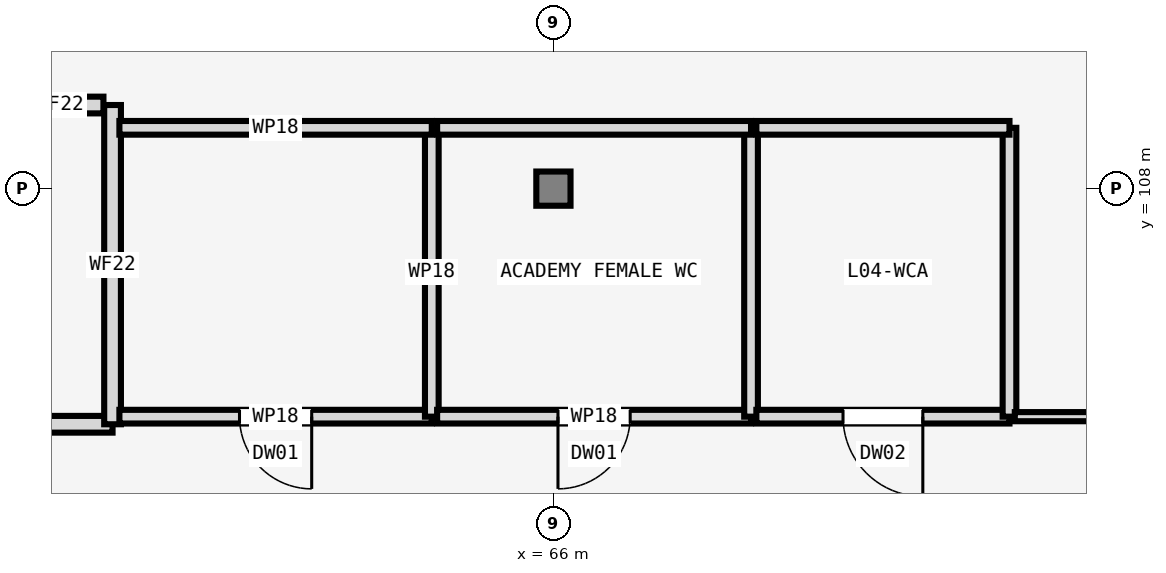
"""IFC4 building model, lengths in metres.
Left out: names, types, materials, properties, quantities, classifications, styles, units other than length and angle.
Written with IfcOpenShell. Run it as: python <this file> out.ifc"""

import sys

from ifc_helpers import new_model, si_unit, direction, frame, frame_2d, origin, origin_2d, place, context, subcontext, project, spatial, rectangle, extrude, element, fill, save


model = new_model("IFC4")
c1 = context("Model", 3, precision=1e-05, world=origin(), true_north=direction((0.0, 1.0)))
c2 = subcontext(c1, "Body", "Model", "MODEL_VIEW")
j1 = project(units=[si_unit("LENGTHUNIT", "METRE"), si_unit("PLANEANGLEUNIT", "RADIAN")], contexts=[c1])
p1 = place(None, origin())
s1 = spatial("IfcSite", under=j1, at=p1, CompositionType="ELEMENT")
p2 = place(p1, origin())
s2 = spatial("IfcBuilding", under=s1, at=p2, CompositionType="ELEMENT")
p3 = place(p2, frame((0.0, 0.0, 17.7)))
s3 = spatial("IfcBuildingStorey", under=s2, at=p3, CompositionType="ELEMENT", Elevation=17.7)
p4 = place(p3, frame((66.0, 108.0, 0.0), z_axis=(0.0, 0.0, 1.0), x_axis=(1.0, 0.0, 0.0)))
e1 = element("IfcColumn", 1, at=p4, inside=s3, PredefinedType="COLUMN", context=c2, shape_type="SweptSolid", body=[
    extrude(rectangle(XDim=0.45, YDim=0.45, at=origin_2d()), origin(), (0.0, 0.0, 1.0), 3.96),
])
p5 = place(p3, frame((55.92, 104.9, 0.0), z_axis=(0.0, 0.0, 1.0), x_axis=(1.0, 0.0, 0.0)))
e2 = element("IfcWall", 2, at=p5, inside=s3, PredefinedType="SOLIDWALL", context=c2, shape_type="SweptSolid", body=[
    extrude(rectangle(XDim=4.28, YDim=0.22, at=frame_2d((2.14, 0.0))), origin(), (0.0, 0.0, 1.0), 3.15),
])
p6 = place(p5, frame((1.24, 0.0, 0.0)))
e3 = element("IfcOpeningElement", 3, at=p6, cuts=e2, PredefinedType="OPENING", context=c2, shape_type="SweptSolid", body=[
    extrude(rectangle(XDim=1.8, YDim=2.2, at=frame_2d((0.9, 1.1))), frame((0.0, 0.12, 0.0), z_axis=(0.0, -1.0, 0.0), x_axis=(1.0, 0.0, 0.0)), (0.0, 0.0, 1.0), 0.24),
])
p7 = place(p3, frame((60.2, 104.9, 0.0), z_axis=(0.0, 0.0, 1.0), x_axis=(0.0, 1.0, 0.0)))
e4 = element("IfcWall", 4, at=p7, inside=s3, PredefinedType="SOLIDWALL", context=c2, shape_type="SweptSolid", body=[
    extrude(rectangle(XDim=4.2, YDim=0.22, at=frame_2d((2.1, 0.0))), origin(), (0.0, 0.0, 1.0), 3.15),
])
p8 = place(p3, frame((58.95, 109.1, 0.0), z_axis=(0.0, 0.0, 1.0), x_axis=(1.0, 0.0, 0.0)))
e5 = element("IfcWall", 5, at=p8, inside=s3, PredefinedType="SOLIDWALL", context=c2, shape_type="SweptSolid", body=[
    extrude(rectangle(XDim=1.13, YDim=0.22, at=frame_2d((0.565, 0.0))), origin(), (0.0, 0.0, 1.0), 3.15),
])
p9 = place(p3, frame((64.4, 105.0, 0.0), z_axis=(0.0, 0.0, 1.0), x_axis=(-1.0, 0.0, 0.0)))
e6 = element("IfcWall", 6, at=p9, inside=s3, PredefinedType="PARTITIONING", context=c2, shape_type="SweptSolid", body=[
    extrude(rectangle(XDim=4.11, YDim=0.18, at=frame_2d((2.055, 0.0))), origin(), (0.0, 0.0, 1.0), 3.15),
])
p10 = place(p9, frame((1.58, 0.0, 0.0)))
e7 = element("IfcOpeningElement", 7, at=p10, cuts=e6, PredefinedType="OPENING", context=c2, shape_type="SweptSolid", body=[
    extrude(rectangle(XDim=0.95, YDim=2.1, at=frame_2d((0.475, 1.05))), frame((0.0, 0.1, 0.0), z_axis=(0.0, -1.0, 0.0), x_axis=(1.0, 0.0, 0.0)), (0.0, 0.0, 1.0), 0.2),
])
p11 = place(p3, frame((64.4, 108.8, 0.0), z_axis=(0.0, 0.0, 1.0), x_axis=(0.0, -1.0, 0.0)))
e8 = element("IfcWall", 8, at=p11, inside=s3, PredefinedType="PARTITIONING", context=c2, shape_type="SweptSolid", body=[
    extrude(rectangle(XDim=3.8, YDim=0.18, at=frame_2d((1.9, 0.0))), origin(), (0.0, 0.0, 1.0), 3.15),
])
p12 = place(p3, frame((60.29, 108.8, 0.0), z_axis=(0.0, 0.0, 1.0), x_axis=(1.0, 0.0, 0.0)))
e9 = element("IfcWall", 9, at=p12, inside=s3, PredefinedType="PARTITIONING", context=c2, shape_type="SweptSolid", body=[
    extrude(rectangle(XDim=4.11, YDim=0.18, at=frame_2d((2.055, 0.0))), origin(), (0.0, 0.0, 1.0), 3.15),
])
p13 = place(p3, frame((68.6, 105.0, 0.0), z_axis=(0.0, 0.0, 1.0), x_axis=(-1.0, 0.0, 0.0)))
e10 = element("IfcWall", 10, at=p13, inside=s3, PredefinedType="PARTITIONING", context=c2, shape_type="SweptSolid", body=[
    extrude(rectangle(XDim=4.13, YDim=0.18, at=frame_2d((2.065, 0.0))), origin(), (0.0, 0.0, 1.0), 3.15),
])
p14 = place(p13, frame((1.59, 0.0, 0.0)))
e11 = element("IfcOpeningElement", 11, at=p14, cuts=e10, PredefinedType="OPENING", context=c2, shape_type="SweptSolid", body=[
    extrude(rectangle(XDim=0.95, YDim=2.1, at=frame_2d((0.475, 1.05))), frame((0.0, 0.1, 0.0), z_axis=(0.0, -1.0, 0.0), x_axis=(1.0, 0.0, 0.0)), (0.0, 0.0, 1.0), 0.2),
])
p15 = place(p3, frame((68.6, 108.8, 0.0), z_axis=(0.0, 0.0, 1.0), x_axis=(0.0, -1.0, 0.0)))
e12 = element("IfcWall", 12, at=p15, inside=s3, PredefinedType="PARTITIONING", context=c2, shape_type="SweptSolid", body=[
    extrude(rectangle(XDim=3.8, YDim=0.18, at=frame_2d((1.9, 0.0))), origin(), (0.0, 0.0, 1.0), 3.15),
])
p16 = place(p3, frame((64.47, 108.8, 0.0), z_axis=(0.0, 0.0, 1.0), x_axis=(1.0, 0.0, 0.0)))
e13 = element("IfcWall", 13, at=p16, inside=s3, PredefinedType="PARTITIONING", context=c2, shape_type="SweptSolid", body=[
    extrude(rectangle(XDim=4.13, YDim=0.18, at=frame_2d((2.065, 0.0))), origin(), (0.0, 0.0, 1.0), 3.15),
])
p17 = place(p3, frame((72.0, 105.0, 0.0), z_axis=(0.0, 0.0, 1.0), x_axis=(-1.0, 0.0, 0.0)))
e14 = element("IfcWall", 14, at=p17, inside=s3, PredefinedType="PARTITIONING", context=c2, shape_type="SweptSolid", body=[
    extrude(rectangle(XDim=3.33, YDim=0.18, at=frame_2d((1.665, 0.0))), origin(), (0.0, 0.0, 1.0), 3.15),
])
p18 = place(p17, frame((1.14, 0.0, 0.0)))
e15 = element("IfcOpeningElement", 15, at=p18, cuts=e14, PredefinedType="OPENING", context=c2, shape_type="SweptSolid", body=[
    extrude(rectangle(XDim=1.05, YDim=2.1, at=frame_2d((0.525, 1.05))), frame((0.0, 0.1, 0.0), z_axis=(0.0, -1.0, 0.0), x_axis=(1.0, 0.0, 0.0)), (0.0, 0.0, 1.0), 0.2),
])
p19 = place(p3, frame((72.0, 108.8, 0.0), z_axis=(0.0, 0.0, 1.0), x_axis=(0.0, -1.0, 0.0)))
e16 = element("IfcWall", 16, at=p19, inside=s3, PredefinedType="PARTITIONING", context=c2, shape_type="SweptSolid", body=[
    extrude(rectangle(XDim=3.8, YDim=0.18, at=frame_2d((1.9, 0.0))), origin(), (0.0, 0.0, 1.0), 3.15),
])
p20 = place(p3, frame((68.67, 108.8, 0.0), z_axis=(0.0, 0.0, 1.0), x_axis=(1.0, 0.0, 0.0)))
e17 = element("IfcWall", 17, at=p20, inside=s3, PredefinedType="PARTITIONING", context=c2, shape_type="SweptSolid", body=[
    extrude(rectangle(XDim=3.33, YDim=0.18, at=frame_2d((1.665, 0.0))), origin(), (0.0, 0.0, 1.0), 3.15),
])
p21 = place(p3, frame((75.6, 105.0, 0.0), z_axis=(0.0, 0.0, 1.0), x_axis=(-1.0, 0.0, 0.0)))
e18 = element("IfcWall", 18, at=p21, inside=s3, PredefinedType="PARTITIONING", context=c2, shape_type="SweptSolid", body=[
    extrude(rectangle(XDim=3.53, YDim=0.12, at=frame_2d((1.765, 0.0))), origin(), (0.0, 0.0, 1.0), 3.15),
])
p22 = place(p21, frame((1.265, 0.0, 0.0)))
e19 = element("IfcOpeningElement", 19, at=p22, cuts=e18, PredefinedType="OPENING", context=c2, shape_type="SweptSolid", body=[
    extrude(rectangle(XDim=1.0, YDim=2.1, at=frame_2d((0.5, 1.05))), frame((0.0, 0.07, 0.0), z_axis=(0.0, -1.0, 0.0), x_axis=(1.0, 0.0, 0.0)), (0.0, 0.0, 1.0), 0.14),
])
p23 = place(p10, origin())
e20 = element("IfcDoor", 20, at=p23, inside=s3, OperationType="SINGLE_SWING_LEFT", PredefinedType="DOOR", context=c2, shape_type="SweptSolid", body=[
    extrude(rectangle(XDim=0.95, YDim=2.1, at=frame_2d((0.475, 1.05))), frame((0.0, 0.025, 0.0), z_axis=(0.0, -1.0, 0.0), x_axis=(1.0, 0.0, 0.0)), (0.0, 0.0, 1.0), 0.05),
])
fill(e7, e20)
p24 = place(p14, origin())
e21 = element("IfcDoor", 21, at=p24, inside=s3, OperationType="SINGLE_SWING_RIGHT", PredefinedType="DOOR", context=c2, shape_type="SweptSolid", body=[
    extrude(rectangle(XDim=0.95, YDim=2.1, at=frame_2d((0.475, 1.05))), frame((0.0, 0.025, 0.0), z_axis=(0.0, -1.0, 0.0), x_axis=(1.0, 0.0, 0.0)), (0.0, 0.0, 1.0), 0.05),
])
fill(e11, e21)
p25 = place(p18, origin())
e22 = element("IfcDoor", 22, at=p25, inside=s3, OperationType="SINGLE_SWING_LEFT", PredefinedType="DOOR", context=c2, shape_type="SweptSolid", body=[
    extrude(rectangle(XDim=1.05, YDim=2.1, at=frame_2d((0.525, 1.05))), frame((0.0, 0.025, 0.0), z_axis=(0.0, -1.0, 0.0), x_axis=(1.0, 0.0, 0.0)), (0.0, 0.0, 1.0), 0.05),
])
fill(e15, e22)
save(model, sys.argv[1])
